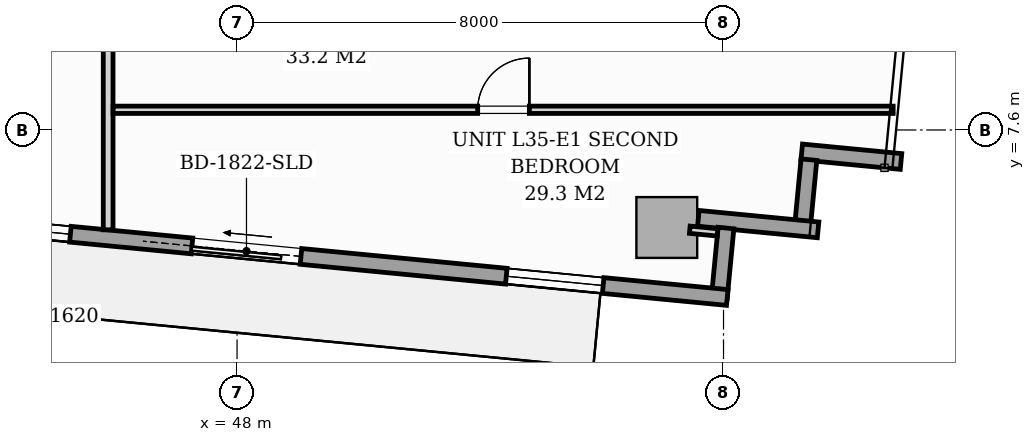
"""IFC4 building model, lengths in metres.
Left out: names, types, materials, properties, quantities, classifications, styles, units other than length and angle.
Written with IfcOpenShell. Run it as: python <this file> out.ifc"""

import sys

from ifc_helpers import new_model, si_unit, direction, frame, frame_2d, origin, origin_2d, place, context, subcontext, project, spatial, rectangle, extrude, source, transform, mapped, element, fill, save


model = new_model("IFC4")
c1 = context("Model", 3, precision=1e-05, world=origin(), true_north=direction((0.0, 1.0)))
c2 = subcontext(c1, "Body", "Model", "MODEL_VIEW")
j1 = project(units=[si_unit("LENGTHUNIT", "METRE"), si_unit("PLANEANGLEUNIT", "RADIAN")], contexts=[c1])
p1 = place(None, origin())
s1 = spatial("IfcSite", under=j1, at=p1, CompositionType="ELEMENT")
p2 = place(p1, origin())
s2 = spatial("IfcBuilding", under=s1, at=p2, CompositionType="ELEMENT")
p3 = place(p2, frame((0.0, 0.0, 124.6)))
s3 = spatial("IfcBuildingStorey", under=s2, at=p3, CompositionType="ELEMENT", Elevation=124.6)
m1 = source(origin(), c2, "Body", "SweptSolid", [
    extrude(rectangle(XDim=1.0, YDim=1.0, at=origin_2d()), origin(), (0.0, 0.0, 1.0), 3.194),
])
p4 = place(p3, frame((55.067, 5.996, 0.004), z_axis=(0.0, 0.0, 1.0), x_axis=(0.995396198367, -0.09584575252, 0.0)))
e1 = element("IfcColumn", 1, at=p4, inside=s3, PredefinedType="COLUMN", context=c2, shape_type="MappedRepresentation", body=[
    mapped(m1, transform((0.0, 0.0, 0.0), scale=1.0)),
])
p5 = place(p3, frame((58.919, 7.082, 0.0), z_axis=(0.0, 0.0, 1.0), x_axis=(-0.995393194909, 0.095876939504, 0.0)))
e2 = element("IfcWall", 2, at=p5, inside=s3, PredefinedType="STANDARD", context=c2, shape_type="SweptSolid", body=[
    extrude(rectangle(XDim=1.64, YDim=0.26, at=frame_2d((0.82, 0.0))), origin(), (0.0, 0.0, 1.0), 2.94),
])
p6 = place(p3, frame((57.405, 7.112, 0.0), z_axis=(0.0, 0.0, 1.0), x_axis=(-0.095971333708, -0.995384098279, 0.0)))
e3 = element("IfcWall", 3, at=p6, inside=s3, PredefinedType="STANDARD", context=c2, shape_type="SweptSolid", body=[
    extrude(rectangle(XDim=1.15, YDim=0.26, at=frame_2d((0.575, 0.0))), origin(), (0.0, 0.0, 1.0), 2.94),
])
p7 = place(p3, frame((57.555, 5.958, 0.0), z_axis=(0.0, 0.0, 1.0), x_axis=(-0.995401789159, 0.095787672171, 0.0)))
e4 = element("IfcWall", 4, at=p7, inside=s3, PredefinedType="STANDARD", context=c2, shape_type="SweptSolid", body=[
    extrude(rectangle(XDim=1.978, YDim=0.26, at=frame_2d((0.989, 0.0))), origin(), (0.0, 0.0, 1.0), 2.94),
])
p8 = place(p3, frame((56.041, 5.988, 0.0), z_axis=(0.0, 0.0, 1.0), x_axis=(-0.095740721699, -0.995406306092, 0.0)))
e5 = element("IfcWall", 5, at=p8, inside=s3, PredefinedType="STANDARD", context=c2, shape_type="SweptSolid", body=[
    extrude(rectangle(XDim=1.15, YDim=0.26, at=frame_2d((0.575, 0.0))), origin(), (0.0, 0.0, 1.0), 2.94),
])
p9 = place(p3, frame((56.061, 4.845, 0.0), z_axis=(0.0, 0.0, 1.0), x_axis=(-0.995395976631, 0.095848055311, 0.0)))
e6 = element("IfcWall", 6, at=p9, inside=s3, PredefinedType="STANDARD", context=c2, shape_type="SweptSolid", body=[
    extrude(rectangle(XDim=17.01, YDim=0.26, at=frame_2d((8.505, 0.0))), origin(), (0.0, 0.0, 1.0), 2.94),
])
p10 = place(p9, frame((7.043, 0.0, 0.0)))
e7 = element("IfcOpeningElement", 7, at=p10, cuts=e6, PredefinedType="OPENING", context=c2, shape_type="SweptSolid", body=[
    extrude(rectangle(XDim=1.8, YDim=2.06, at=frame_2d((0.9, 1.03))), frame((0.0, 0.14, 0.0), z_axis=(0.0, -1.0, 0.0), x_axis=(1.0, 0.0, 0.0)), (0.0, 0.0, 1.0), 0.28),
])
p11 = place(p9, frame((2.05, 0.0, 0.65)))
e8 = element("IfcOpeningElement", 8, at=p11, cuts=e6, PredefinedType="OPENING", context=c2, shape_type="SweptSolid", body=[
    extrude(rectangle(XDim=1.6, YDim=1.5, at=frame_2d((0.8, 0.75))), frame((0.0, 0.14, 0.0), z_axis=(0.0, -1.0, 0.0), x_axis=(1.0, 0.0, 0.0)), (0.0, 0.0, 1.0), 0.28),
])
p12 = place(p9, frame((10.852, 0.0, 0.75)))
e9 = element("IfcOpeningElement", 9, at=p12, cuts=e6, PredefinedType="OPENING", context=c2, shape_type="SweptSolid", body=[
    extrude(rectangle(XDim=1.6, YDim=1.5, at=frame_2d((0.8, 0.75))), frame((0.0, 0.14, 0.0), z_axis=(0.0, -1.0, 0.0), x_axis=(1.0, 0.0, 0.0)), (0.0, 0.0, 1.0), 0.28),
])
p13 = place(p3, frame((45.88, 5.958, 0.0), z_axis=(0.0, 0.0, 1.0), x_axis=(0.0, 1.0, 0.0)))
e10 = element("IfcWall", 10, at=p13, inside=s3, PredefinedType="PARTITIONING", context=c2, shape_type="SweptSolid", body=[
    extrude(rectangle(XDim=6.51, YDim=0.16, at=frame_2d((3.255, 0.0))), origin(), (0.0, 0.0, 1.0), 2.94),
])
p14 = place(p3, frame((45.962, 7.932, 0.0), z_axis=(0.0, 0.0, 1.0), x_axis=(1.0, 0.0, 0.0)))
e11 = element("IfcWall", 11, at=p14, inside=s3, PredefinedType="PARTITIONING", context=c2, shape_type="SweptSolid", body=[
    extrude(rectangle(XDim=12.828, YDim=0.12, at=frame_2d((6.414, 0.0))), origin(), (0.0, 0.0, 1.0), 2.94),
])
p15 = place(p14, frame((5.995, 0.0, 0.0)))
e12 = element("IfcOpeningElement", 12, at=p15, cuts=e11, PredefinedType="OPENING", context=c2, shape_type="SweptSolid", body=[
    extrude(rectangle(XDim=0.85, YDim=2.05, at=frame_2d((0.425, 1.025))), frame((0.0, 0.07, 0.0), z_axis=(0.0, -1.0, 0.0), x_axis=(1.0, 0.0, 0.0)), (0.0, 0.0, 1.0), 0.14),
])
p16 = place(p3, frame((55.445, 5.96, 0.0), z_axis=(0.0, 0.0, 1.0), x_axis=(0.995384576284, -0.09596637586, 0.0)))
e13 = element("IfcWall", 13, at=p16, inside=s3, PredefinedType="PARTITIONING", context=c2, shape_type="SweptSolid", body=[
    extrude(rectangle(XDim=0.458, YDim=0.12, at=frame_2d((0.229, 0.0))), origin(), (0.0, 0.0, 1.0), 2.94),
])
m2 = source(origin(), c2, "Body", "SweptSolid", [
    extrude(rectangle(XDim=1.8, YDim=2.06, at=frame_2d((0.9, 1.03))), frame((0.0, 0.025, 0.0), z_axis=(0.0, -1.0, 0.0), x_axis=(1.0, 0.0, 0.0)), (0.0, 0.0, 1.0), 0.05),
])
p17 = place(p10, origin())
e14 = element("IfcDoor", 14, at=p17, inside=s3, OperationType="SLIDING_TO_RIGHT", PredefinedType="DOOR", context=c2, shape_type="MappedRepresentation", body=[
    mapped(m2, transform((0.0, 0.0, 0.0), scale=1.0)),
])
fill(e7, e14)
m3 = source(origin(), c2, "Body", "SweptSolid", [
    extrude(rectangle(XDim=1.6, YDim=1.5, at=frame_2d((0.8, 0.75))), frame((0.0, 0.03, 0.0), z_axis=(0.0, -1.0, 0.0), x_axis=(1.0, 0.0, 0.0)), (0.0, 0.0, 1.0), 0.06),
])
p18 = place(p11, origin())
e15 = element("IfcWindow", 15, at=p18, inside=s3, PartitioningType="SINGLE_PANEL", PredefinedType="WINDOW", context=c2, shape_type="MappedRepresentation", body=[
    mapped(m3, transform((0.0, 0.0, 0.0), scale=1.0)),
])
fill(e8, e15)
p19 = place(p12, origin())
e16 = element("IfcWindow", 16, at=p19, inside=s3, PartitioningType="SINGLE_PANEL", PredefinedType="WINDOW", context=c2, shape_type="MappedRepresentation", body=[
    mapped(m3, transform((0.0, 0.0, 0.0), scale=1.0)),
])
fill(e9, e16)
m4 = source(origin(), c2, "Body", "SweptSolid", [
    extrude(rectangle(XDim=0.85, YDim=2.05, at=frame_2d((0.425, 1.025))), frame((0.0, 0.025, 0.0), z_axis=(0.0, -1.0, 0.0), x_axis=(1.0, 0.0, 0.0)), (0.0, 0.0, 1.0), 0.05),
])
p20 = place(p15, origin())
e17 = element("IfcDoor", 17, at=p20, inside=s3, OperationType="SINGLE_SWING_RIGHT", PredefinedType="DOOR", context=c2, shape_type="MappedRepresentation", body=[
    mapped(m4, transform((0.0, 0.0, 0.0), scale=1.0)),
])
fill(e12, e17)
save(model, sys.argv[1])
